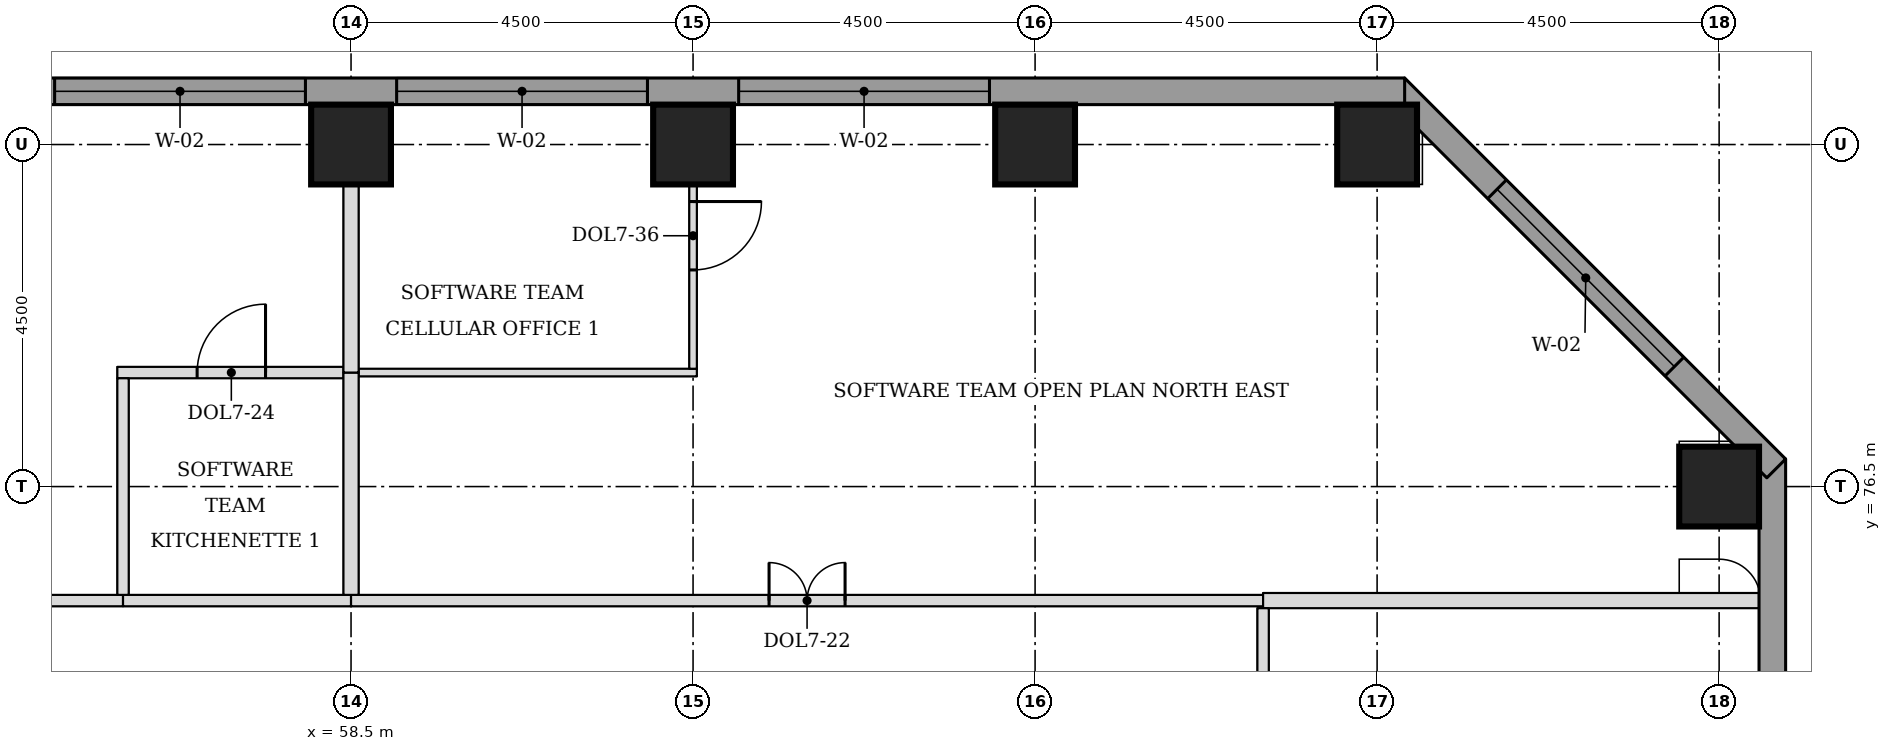
"""IFC4 building model, lengths in metres.
Left out: names, types, materials, properties, quantities, classifications, styles, units other than length and angle.
Written with IfcOpenShell. Run it as: python <this file> out.ifc"""

import sys

from ifc_helpers import new_model, si_unit, direction, frame, frame_2d, origin, origin_2d, place, context, subcontext, project, spatial, rectangle, extrude, element, fill, save


model = new_model("IFC4")
c1 = context("Model", 3, precision=1e-05, world=origin(), true_north=direction((0.0, 1.0)))
c2 = subcontext(c1, "Body", "Model", "MODEL_VIEW")
j1 = project(units=[si_unit("LENGTHUNIT", "METRE"), si_unit("PLANEANGLEUNIT", "RADIAN")], contexts=[c1])
p1 = place(None, origin())
s1 = spatial("IfcSite", under=j1, at=p1, CompositionType="ELEMENT")
p2 = place(p1, origin())
s2 = spatial("IfcBuilding", under=s1, at=p2, CompositionType="ELEMENT")
p3 = place(p2, frame((0.0, 0.0, 130.7)))
s3 = spatial("IfcBuildingStorey", under=s2, at=p3, CompositionType="ELEMENT", Elevation=130.7)
for number, where, z_axis, x_axis in (
    (1, (76.5, 76.5, 0.0), (0.0, 0.0, 1.0), (1.0, 0.0, 0.0)),
    (2, (58.5, 81.0, 0.0), (0.0, 0.0, 1.0), (1.0, 0.0, 0.0)),
    (3, (63.0, 81.0, 0.0), (0.0, 0.0, 1.0), (1.0, 0.0, 0.0)),
    (4, (67.5, 81.0, 0.0), (0.0, 0.0, 1.0), (1.0, 0.0, 0.0)),
    (5, (72.0, 81.0, 0.0), (0.0, 0.0, 1.0), (1.0, 0.0, 0.0)),
):
    element("IfcColumn", number, at=place(p3, frame(where, z_axis=z_axis, x_axis=x_axis)), inside=s3, PredefinedType="COLUMN", context=c2, shape_type="SweptSolid", body=[
        extrude(rectangle(XDim=1.05, YDim=1.05, at=origin_2d()), origin(), (0.0, 0.0, 1.0), 3.7),
    ])
p4 = place(p3, frame((77.2, 44.638, 0.0), z_axis=(0.0, 0.0, 1.0), x_axis=(0.0, 1.0, 0.0)))
e6 = element("IfcWall", 6, at=p4, inside=s3, PredefinedType="STANDARD", context=c2, shape_type="SweptSolid", body=[
    extrude(rectangle(XDim=32.225, YDim=0.35, at=frame_2d((16.112, 0.0))), origin(), (0.0, 0.0, 1.0), 3.525),
])
p5 = place(p4, frame((5.462, 0.0, 0.9)))
e7 = element("IfcOpeningElement", 7, at=p5, cuts=e6, PredefinedType="OPENING", context=c2, shape_type="SweptSolid", body=[
    extrude(rectangle(XDim=3.3, YDim=1.9, at=frame_2d((1.65, 0.95))), frame((0.0, 0.185, 0.0), z_axis=(0.0, -1.0, 0.0), x_axis=(1.0, 0.0, 0.0)), (0.0, 0.0, 1.0), 0.37),
])
p6 = place(p4, frame((9.962, 0.0, 0.9)))
e8 = element("IfcOpeningElement", 8, at=p6, cuts=e6, PredefinedType="OPENING", context=c2, shape_type="SweptSolid", body=[
    extrude(rectangle(XDim=3.3, YDim=1.9, at=frame_2d((1.65, 0.95))), frame((0.0, 0.185, 0.0), z_axis=(0.0, -1.0, 0.0), x_axis=(1.0, 0.0, 0.0)), (0.0, 0.0, 1.0), 0.37),
])
p7 = place(p4, frame((14.462, 0.0, 0.9)))
e9 = element("IfcOpeningElement", 9, at=p7, cuts=e6, PredefinedType="OPENING", context=c2, shape_type="SweptSolid", body=[
    extrude(rectangle(XDim=3.3, YDim=1.9, at=frame_2d((1.65, 0.95))), frame((0.0, 0.185, 0.0), z_axis=(0.0, -1.0, 0.0), x_axis=(1.0, 0.0, 0.0)), (0.0, 0.0, 1.0), 0.37),
])
p8 = place(p4, frame((18.962, 0.0, 0.9)))
e10 = element("IfcOpeningElement", 10, at=p8, cuts=e6, PredefinedType="OPENING", context=c2, shape_type="SweptSolid", body=[
    extrude(rectangle(XDim=3.3, YDim=1.9, at=frame_2d((1.65, 0.95))), frame((0.0, 0.185, 0.0), z_axis=(0.0, -1.0, 0.0), x_axis=(1.0, 0.0, 0.0)), (0.0, 0.0, 1.0), 0.37),
])
p9 = place(p4, frame((23.462, 0.0, 0.9)))
e11 = element("IfcOpeningElement", 11, at=p9, cuts=e6, PredefinedType="OPENING", context=c2, shape_type="SweptSolid", body=[
    extrude(rectangle(XDim=3.3, YDim=1.9, at=frame_2d((1.65, 0.95))), frame((0.0, 0.185, 0.0), z_axis=(0.0, -1.0, 0.0), x_axis=(1.0, 0.0, 0.0)), (0.0, 0.0, 1.0), 0.37),
])
p10 = place(p3, frame((77.251, 76.739, 0.0), z_axis=(0.0, 0.0, 1.0), x_axis=(-0.707106781187, 0.707106781187, 0.0)))
e12 = element("IfcWall", 12, at=p10, inside=s3, PredefinedType="STANDARD", context=c2, shape_type="SweptSolid", body=[
    extrude(rectangle(XDim=7.089, YDim=0.35, at=frame_2d((3.544, 0.0))), origin(), (0.0, 0.0, 1.0), 3.525),
])
p11 = place(p10, frame((1.894, 0.0, 0.9)))
e13 = element("IfcOpeningElement", 13, at=p11, cuts=e12, PredefinedType="OPENING", context=c2, shape_type="SweptSolid", body=[
    extrude(rectangle(XDim=3.3, YDim=1.9, at=frame_2d((1.65, 0.95))), frame((0.0, 0.185, 0.0), z_axis=(0.0, -1.0, 0.0), x_axis=(1.0, 0.0, 0.0)), (0.0, 0.0, 1.0), 0.37),
])
p12 = place(p3, frame((72.362, 81.7, 0.0), z_axis=(0.0, 0.0, 1.0), x_axis=(-1.0, 0.0, 0.0)))
e14 = element("IfcWall", 14, at=p12, inside=s3, PredefinedType="STANDARD", context=c2, shape_type="SweptSolid", body=[
    extrude(rectangle(XDim=32.225, YDim=0.35, at=frame_2d((16.112, 0.0))), origin(), (0.0, 0.0, 1.0), 3.525),
])
p13 = place(p12, frame((5.462, 0.0, 0.9)))
e15 = element("IfcOpeningElement", 15, at=p13, cuts=e14, PredefinedType="OPENING", context=c2, shape_type="SweptSolid", body=[
    extrude(rectangle(XDim=3.3, YDim=1.9, at=frame_2d((1.65, 0.95))), frame((0.0, 0.185, 0.0), z_axis=(0.0, -1.0, 0.0), x_axis=(1.0, 0.0, 0.0)), (0.0, 0.0, 1.0), 0.37),
])
p14 = place(p12, frame((9.962, 0.0, 0.9)))
e16 = element("IfcOpeningElement", 16, at=p14, cuts=e14, PredefinedType="OPENING", context=c2, shape_type="SweptSolid", body=[
    extrude(rectangle(XDim=3.3, YDim=1.9, at=frame_2d((1.65, 0.95))), frame((0.0, 0.185, 0.0), z_axis=(0.0, -1.0, 0.0), x_axis=(1.0, 0.0, 0.0)), (0.0, 0.0, 1.0), 0.37),
])
p15 = place(p12, frame((14.462, 0.0, 0.9)))
e17 = element("IfcOpeningElement", 17, at=p15, cuts=e14, PredefinedType="OPENING", context=c2, shape_type="SweptSolid", body=[
    extrude(rectangle(XDim=3.3, YDim=1.9, at=frame_2d((1.65, 0.95))), frame((0.0, 0.185, 0.0), z_axis=(0.0, -1.0, 0.0), x_axis=(1.0, 0.0, 0.0)), (0.0, 0.0, 1.0), 0.37),
])
p16 = place(p12, frame((18.962, 0.0, 0.9)))
e18 = element("IfcOpeningElement", 18, at=p16, cuts=e14, PredefinedType="OPENING", context=c2, shape_type="SweptSolid", body=[
    extrude(rectangle(XDim=3.3, YDim=1.9, at=frame_2d((1.65, 0.95))), frame((0.0, 0.185, 0.0), z_axis=(0.0, -1.0, 0.0), x_axis=(1.0, 0.0, 0.0)), (0.0, 0.0, 1.0), 0.37),
])
p17 = place(p12, frame((23.462, 0.0, 0.9)))
e19 = element("IfcOpeningElement", 19, at=p17, cuts=e14, PredefinedType="OPENING", context=c2, shape_type="SweptSolid", body=[
    extrude(rectangle(XDim=3.3, YDim=1.9, at=frame_2d((1.65, 0.95))), frame((0.0, 0.185, 0.0), z_axis=(0.0, -1.0, 0.0), x_axis=(1.0, 0.0, 0.0)), (0.0, 0.0, 1.0), 0.37),
])
p18 = place(p3, frame((46.5, 75.0, 0.0), z_axis=(0.0, 0.0, 1.0), x_axis=(1.0, 0.0, 0.0)))
e20 = element("IfcWall", 20, at=p18, inside=s3, PredefinedType="PARTITIONING", context=c2, shape_type="SweptSolid", body=[
    extrude(rectangle(XDim=9.0, YDim=0.15, at=frame_2d((4.5, 0.0))), origin(), (0.0, 0.0, 1.0), 3.55),
])
p19 = place(p3, frame((55.5, 75.0, 0.0), z_axis=(0.0, 0.0, 1.0), x_axis=(1.0, 0.0, 0.0)))
e21 = element("IfcWall", 21, at=p19, inside=s3, PredefinedType="PARTITIONING", context=c2, shape_type="SweptSolid", body=[
    extrude(rectangle(XDim=3.0, YDim=0.15, at=frame_2d((1.5, 0.0))), origin(), (0.0, 0.0, 1.0), 3.55),
])
p20 = place(p3, frame((58.5, 75.0, 0.0), z_axis=(0.0, 0.0, 1.0), x_axis=(1.0, 0.0, 0.0)))
e22 = element("IfcWall", 22, at=p20, inside=s3, PredefinedType="PARTITIONING", context=c2, shape_type="SweptSolid", body=[
    extrude(rectangle(XDim=12.0, YDim=0.15, at=frame_2d((6.0, 0.0))), origin(), (0.0, 0.0, 1.0), 3.55),
])
p21 = place(p20, frame((5.5, 0.0, 0.0)))
e23 = element("IfcOpeningElement", 23, at=p21, cuts=e22, PredefinedType="OPENING", context=c2, shape_type="SweptSolid", body=[
    extrude(rectangle(XDim=1.0, YDim=2.1, at=frame_2d((0.5, 1.05))), frame((0.0, 0.085, 0.0), z_axis=(0.0, -1.0, 0.0), x_axis=(1.0, 0.0, 0.0)), (0.0, 0.0, 1.0), 0.17),
])
p22 = place(p3, frame((70.5, 75.0, 0.0), z_axis=(0.0, 0.0, 1.0), x_axis=(1.0, 0.0, 0.0)))
e24 = element("IfcWall", 24, at=p22, inside=s3, PredefinedType="PARTITIONING", context=c2, shape_type="SweptSolid", body=[
    extrude(rectangle(XDim=6.525, YDim=0.2, at=frame_2d((3.262, 0.0))), origin(), (0.0, 0.0, 1.0), 3.55),
])
p23 = place(p3, frame((55.425, 78.0, 0.0), z_axis=(0.0, 0.0, 1.0), x_axis=(1.0, 0.0, 0.0)))
e25 = element("IfcWall", 25, at=p23, inside=s3, PredefinedType="PARTITIONING", context=c2, shape_type="SweptSolid", body=[
    extrude(rectangle(XDim=2.975, YDim=0.15, at=frame_2d((1.487, 0.0))), origin(), (0.0, 0.0, 1.0), 3.55),
])
p24 = place(p23, frame((1.05, 0.0, 0.0)))
e26 = element("IfcOpeningElement", 26, at=p24, cuts=e25, PredefinedType="OPENING", context=c2, shape_type="SweptSolid", body=[
    extrude(rectangle(XDim=0.9, YDim=2.1, at=frame_2d((0.45, 1.05))), frame((0.0, 0.085, 0.0), z_axis=(0.0, -1.0, 0.0), x_axis=(1.0, 0.0, 0.0)), (0.0, 0.0, 1.0), 0.17),
])
p25 = place(p3, frame((58.6, 78.0, 0.0), z_axis=(0.0, 0.0, 1.0), x_axis=(1.0, 0.0, 0.0)))
e27 = element("IfcWall", 27, at=p25, inside=s3, PredefinedType="PARTITIONING", context=c2, shape_type="SweptSolid", body=[
    extrude(rectangle(XDim=4.45, YDim=0.1, at=frame_2d((2.225, 0.0))), origin(), (0.0, 0.0, 1.0), 3.55),
])
p26 = place(p3, frame((70.5, 63.0, 0.0), z_axis=(0.0, 0.0, 1.0), x_axis=(0.0, 1.0, 0.0)))
e28 = element("IfcWall", 28, at=p26, inside=s3, PredefinedType="PARTITIONING", context=c2, shape_type="SweptSolid", body=[
    extrude(rectangle(XDim=11.9, YDim=0.15, at=frame_2d((5.95, 0.0))), origin(), (0.0, 0.0, 1.0), 3.55),
])
p27 = place(p26, frame((5.45, 0.0, 0.0)))
e29 = element("IfcOpeningElement", 29, at=p27, cuts=e28, PredefinedType="OPENING", context=c2, shape_type="SweptSolid", body=[
    extrude(rectangle(XDim=1.0, YDim=2.1, at=frame_2d((0.5, 1.05))), frame((0.0, 0.085, 0.0), z_axis=(0.0, -1.0, 0.0), x_axis=(1.0, 0.0, 0.0)), (0.0, 0.0, 1.0), 0.17),
])
p28 = place(p3, frame((55.5, 75.075, 0.0), z_axis=(0.0, 0.0, 1.0), x_axis=(0.0, 1.0, 0.0)))
e30 = element("IfcWall", 30, at=p28, inside=s3, PredefinedType="PARTITIONING", context=c2, shape_type="SweptSolid", body=[
    extrude(rectangle(XDim=2.85, YDim=0.15, at=frame_2d((1.425, 0.0))), origin(), (0.0, 0.0, 1.0), 3.55),
])
p29 = place(p3, frame((58.5, 75.075, 0.0), z_axis=(0.0, 0.0, 1.0), x_axis=(0.0, 1.0, 0.0)))
e31 = element("IfcWall", 31, at=p29, inside=s3, PredefinedType="PARTITIONING", context=c2, shape_type="SweptSolid", body=[
    extrude(rectangle(XDim=2.925, YDim=0.2, at=frame_2d((1.462, 0.0))), origin(), (0.0, 0.0, 1.0), 3.55),
])
p30 = place(p3, frame((58.5, 78.0, 0.0), z_axis=(0.0, 0.0, 1.0), x_axis=(0.0, 1.0, 0.0)))
e32 = element("IfcWall", 32, at=p30, inside=s3, PredefinedType="PARTITIONING", context=c2, shape_type="SweptSolid", body=[
    extrude(rectangle(XDim=3.525, YDim=0.2, at=frame_2d((1.762, 0.0))), origin(), (0.0, 0.0, 1.0), 3.55),
])
p31 = place(p3, frame((63.0, 78.05, 0.0), z_axis=(0.0, 0.0, 1.0), x_axis=(0.0, 1.0, 0.0)))
e33 = element("IfcWall", 33, at=p31, inside=s3, PredefinedType="PARTITIONING", context=c2, shape_type="SweptSolid", body=[
    extrude(rectangle(XDim=3.475, YDim=0.1, at=frame_2d((1.737, 0.0))), origin(), (0.0, 0.0, 1.0), 3.55),
])
p32 = place(p31, frame((1.3, 0.0, 0.0)))
e34 = element("IfcOpeningElement", 34, at=p32, cuts=e33, PredefinedType="OPENING", context=c2, shape_type="SweptSolid", body=[
    extrude(rectangle(XDim=0.9, YDim=2.1, at=frame_2d((0.45, 1.05))), frame((0.0, 0.06, 0.0), z_axis=(0.0, -1.0, 0.0), x_axis=(1.0, 0.0, 0.0)), (0.0, 0.0, 1.0), 0.12),
])
p33 = place(p11, origin())
e35 = element("IfcWindow", 35, at=p33, inside=s3, PartitioningType="SINGLE_PANEL", PredefinedType="WINDOW", context=c2, shape_type="SweptSolid", body=[
    extrude(rectangle(XDim=3.3, YDim=1.9, at=frame_2d((1.65, 0.95))), frame((0.0, 0.085, 0.0), z_axis=(0.0, -1.0, 0.0), x_axis=(1.0, 0.0, 0.0)), (0.0, 0.0, 1.0), 0.06),
])
fill(e13, e35)
p34 = place(p13, origin())
e36 = element("IfcWindow", 36, at=p34, inside=s3, PartitioningType="SINGLE_PANEL", PredefinedType="WINDOW", context=c2, shape_type="SweptSolid", body=[
    extrude(rectangle(XDim=3.3, YDim=1.9, at=frame_2d((1.65, 0.95))), frame((0.0, 0.085, 0.0), z_axis=(0.0, -1.0, 0.0), x_axis=(1.0, 0.0, 0.0)), (0.0, 0.0, 1.0), 0.06),
])
fill(e15, e36)
p35 = place(p14, origin())
e37 = element("IfcWindow", 37, at=p35, inside=s3, PartitioningType="SINGLE_PANEL", PredefinedType="WINDOW", context=c2, shape_type="SweptSolid", body=[
    extrude(rectangle(XDim=3.3, YDim=1.9, at=frame_2d((1.65, 0.95))), frame((0.0, 0.085, 0.0), z_axis=(0.0, -1.0, 0.0), x_axis=(1.0, 0.0, 0.0)), (0.0, 0.0, 1.0), 0.06),
])
fill(e16, e37)
p36 = place(p15, origin())
e38 = element("IfcWindow", 38, at=p36, inside=s3, PartitioningType="SINGLE_PANEL", PredefinedType="WINDOW", context=c2, shape_type="SweptSolid", body=[
    extrude(rectangle(XDim=3.3, YDim=1.9, at=frame_2d((1.65, 0.95))), frame((0.0, 0.085, 0.0), z_axis=(0.0, -1.0, 0.0), x_axis=(1.0, 0.0, 0.0)), (0.0, 0.0, 1.0), 0.06),
])
fill(e17, e38)
p37 = place(p24, origin())
e39 = element("IfcDoor", 39, at=p37, inside=s3, OperationType="SINGLE_SWING_RIGHT", PredefinedType="DOOR", context=c2, shape_type="SweptSolid", body=[
    extrude(rectangle(XDim=0.9, YDim=2.1, at=frame_2d((0.45, 1.05))), frame((0.0, 0.025, 0.0), z_axis=(0.0, -1.0, 0.0), x_axis=(1.0, 0.0, 0.0)), (0.0, 0.0, 1.0), 0.05),
])
fill(e26, e39)
p38 = place(p21, origin())
e40 = element("IfcDoor", 40, at=p38, inside=s3, OperationType="DOUBLE_DOOR_SINGLE_SWING", PredefinedType="DOOR", context=c2, shape_type="SweptSolid", body=[
    extrude(rectangle(XDim=1.0, YDim=2.1, at=frame_2d((0.5, 1.05))), frame((0.0, 0.025, 0.0), z_axis=(0.0, -1.0, 0.0), x_axis=(1.0, 0.0, 0.0)), (0.0, 0.0, 1.0), 0.05),
])
fill(e23, e40)
p39 = place(p32, frame((0.9, 0.0, 0.0), z_axis=(0.0, 0.0, 1.0), x_axis=(-1.0, 0.0, 0.0)))
e41 = element("IfcDoor", 41, at=p39, inside=s3, OperationType="SINGLE_SWING_LEFT", PredefinedType="DOOR", context=c2, shape_type="SweptSolid", body=[
    extrude(rectangle(XDim=0.9, YDim=2.1, at=frame_2d((0.45, 1.05))), frame((0.0, 0.025, 0.0), z_axis=(0.0, -1.0, 0.0), x_axis=(1.0, 0.0, 0.0)), (0.0, 0.0, 1.0), 0.05),
])
fill(e34, e41)
save(model, sys.argv[1])
